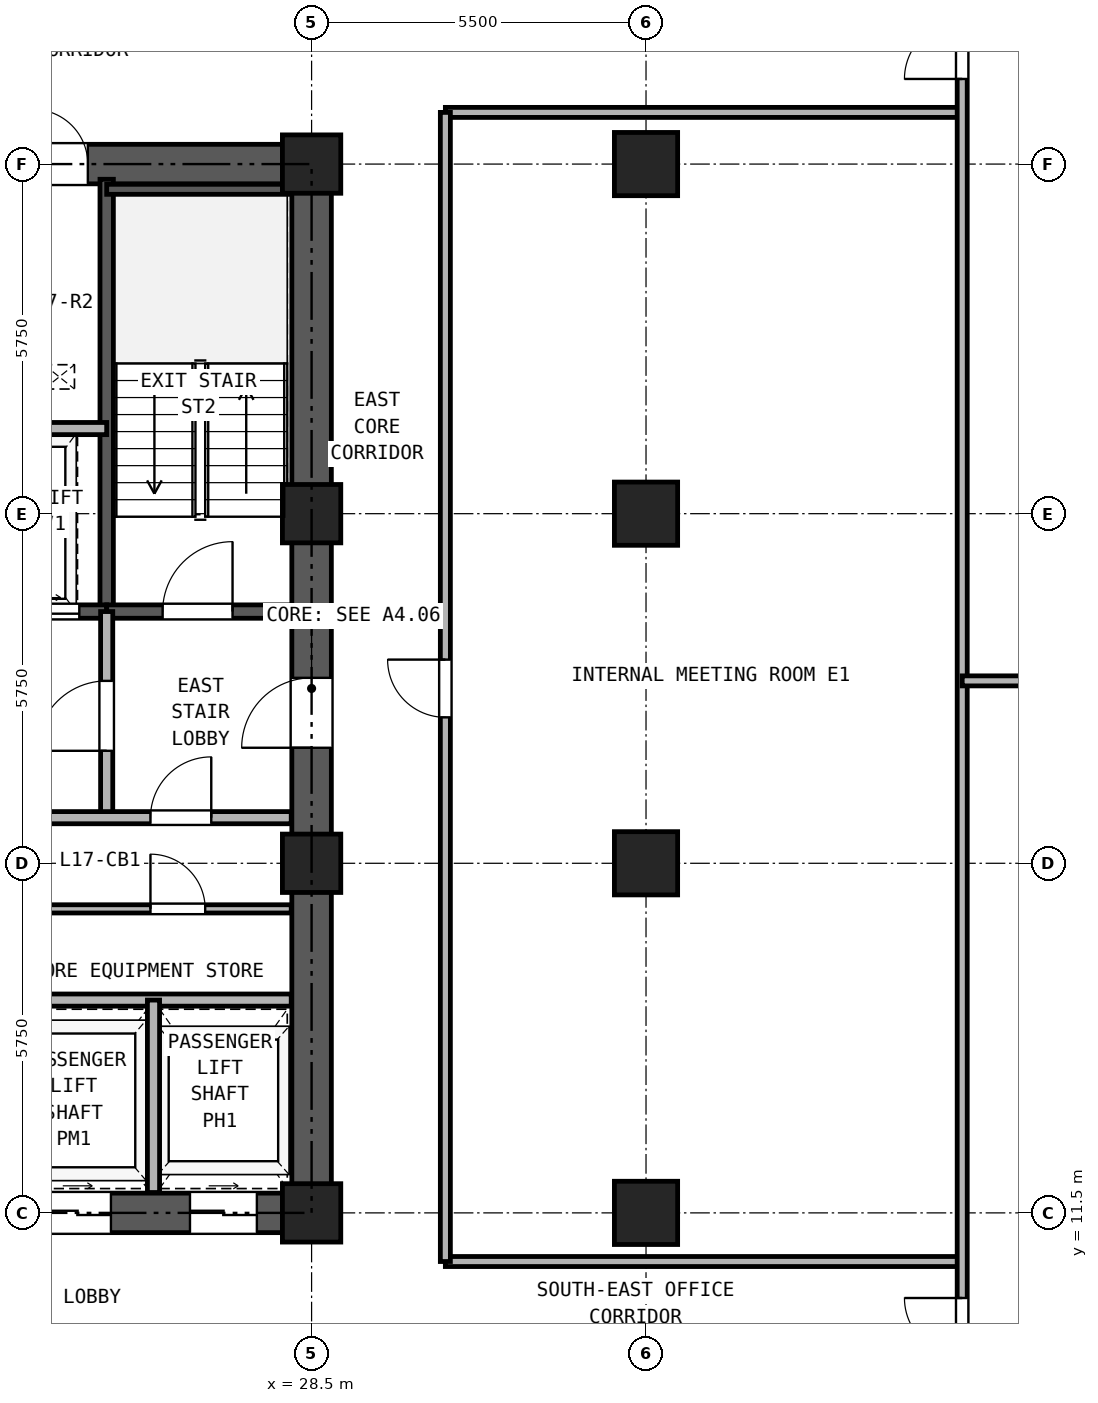
"""IFC4 building model, lengths in metres.
Left out: names, types, materials, properties, quantities, classifications, styles, units other than length and angle.
Written with IfcOpenShell. Run it as: python <this file> out.ifc"""

import sys

from ifc_helpers import new_model, si_unit, direction, frame, frame_2d, origin, origin_2d, place, context, subcontext, project, spatial, rectangle, hollow_rectangle, extrude, source, transform, mapped, element, fill, save


model = new_model("IFC4")
c1 = context("Model", 3, precision=1e-05, world=origin(), true_north=direction((0.0, 1.0)))
c2 = subcontext(c1, "Body", "Model", "MODEL_VIEW")
j1 = project(units=[si_unit("LENGTHUNIT", "METRE"), si_unit("PLANEANGLEUNIT", "RADIAN")], contexts=[c1])
p1 = place(None, origin())
s1 = spatial("IfcSite", under=j1, at=p1, CompositionType="ELEMENT")
p2 = place(p1, origin())
s2 = spatial("IfcBuilding", under=s1, at=p2, CompositionType="ELEMENT")
p3 = place(p2, frame((0.0, 0.0, 65.7)))
s3 = spatial("IfcBuildingStorey", under=s2, at=p3, CompositionType="ELEMENT", Elevation=65.7)
m1 = source(origin(), c2, "Body", "SweptSolid", [
    extrude(hollow_rectangle(XDim=0.96, YDim=0.96, WallThickness=0.06, at=origin_2d()), origin(), (0.0, 0.0, 1.0), 3.32),
])
for number, where, z_axis, x_axis in (
    (1, (28.5, 11.5, 0.0), (0.0, 0.0, 1.0), (1.0, 0.0, 0.0)),
    (2, (28.5, 17.25, 0.0), (0.0, 0.0, 1.0), (1.0, 0.0, 0.0)),
    (3, (28.5, 23.0, 0.0), (0.0, 0.0, 1.0), (1.0, 0.0, 0.0)),
    (4, (28.5, 28.75, 0.0), (0.0, 0.0, 1.0), (1.0, 0.0, 0.0)),
):
    element("IfcColumn", number, at=place(p3, frame(where, z_axis=z_axis, x_axis=x_axis)), inside=s3, PredefinedType="COLUMN", context=c2, shape_type="MappedRepresentation", body=[
        mapped(m1, transform((0.0, 0.0, 0.0), x_axis=(1.0, 0.0, 0.0), y_axis=(0.0, 1.0, 0.0), z_axis=(0.0, 0.0, 1.0), scale=1.0)),
    ])
m2 = source(origin(), c2, "Body", "SweptSolid", [
    extrude(hollow_rectangle(XDim=1.04, YDim=1.04, WallThickness=0.065, at=origin_2d()), origin(), (0.0, 0.0, 1.0), 3.32),
])
for number, where, z_axis, x_axis in (
    (5, (34.0, 11.5, 0.0), (0.0, 0.0, 1.0), (1.0, 0.0, 0.0)),
    (6, (34.0, 17.25, 0.0), (0.0, 0.0, 1.0), (1.0, 0.0, 0.0)),
    (7, (34.0, 23.0, 0.0), (0.0, 0.0, 1.0), (1.0, 0.0, 0.0)),
    (8, (34.0, 28.75, 0.0), (0.0, 0.0, 1.0), (1.0, 0.0, 0.0)),
):
    element("IfcColumn", number, at=place(p3, frame(where, z_axis=z_axis, x_axis=x_axis)), inside=s3, PredefinedType="COLUMN", context=c2, shape_type="MappedRepresentation", body=[
        mapped(m2, transform((0.0, 0.0, 0.0), x_axis=(1.0, 0.0, 0.0), y_axis=(0.0, 1.0, 0.0), z_axis=(0.0, 0.0, 1.0), scale=1.0)),
    ])
p4 = place(p3, frame((18.175, 11.5, 0.0), z_axis=(0.0, 0.0, 1.0), x_axis=(1.0, 0.0, 0.0)))
e9 = element("IfcWall", 9, at=p4, inside=s3, PredefinedType="SHEAR", context=c2, shape_type="SweptSolid", body=[
    extrude(rectangle(XDim=10.65, YDim=0.65, at=frame_2d((5.325, 0.0))), origin(), (0.0, 0.0, 1.0), 3.32),
])
p5 = place(p4, frame((1.195, 0.0, 0.0)))
e10 = element("IfcOpeningElement", 10, at=p5, cuts=e9, PredefinedType="OPENING", context=c2, shape_type="SweptSolid", body=[
    extrude(rectangle(XDim=1.1, YDim=2.25, at=frame_2d((0.55, 1.125))), frame((0.0, 0.335, 0.0), z_axis=(0.0, -1.0, 0.0), x_axis=(1.0, 0.0, 0.0)), (0.0, 0.0, 1.0), 0.67),
])
p6 = place(p4, frame((3.495, 0.0, 0.0)))
e11 = element("IfcOpeningElement", 11, at=p6, cuts=e9, PredefinedType="OPENING", context=c2, shape_type="SweptSolid", body=[
    extrude(rectangle(XDim=1.1, YDim=2.25, at=frame_2d((0.55, 1.125))), frame((0.0, 0.335, 0.0), z_axis=(0.0, -1.0, 0.0), x_axis=(1.0, 0.0, 0.0)), (0.0, 0.0, 1.0), 0.67),
])
p7 = place(p4, frame((5.925, 0.0, 0.0)))
e12 = element("IfcOpeningElement", 12, at=p7, cuts=e9, PredefinedType="OPENING", context=c2, shape_type="SweptSolid", body=[
    extrude(rectangle(XDim=1.1, YDim=2.25, at=frame_2d((0.55, 1.125))), frame((0.0, 0.335, 0.0), z_axis=(0.0, -1.0, 0.0), x_axis=(1.0, 0.0, 0.0)), (0.0, 0.0, 1.0), 0.67),
])
p8 = place(p4, frame((8.325, 0.0, 0.0)))
e13 = element("IfcOpeningElement", 13, at=p8, cuts=e9, PredefinedType="OPENING", context=c2, shape_type="SweptSolid", body=[
    extrude(rectangle(XDim=1.1, YDim=2.25, at=frame_2d((0.55, 1.125))), frame((0.0, 0.335, 0.0), z_axis=(0.0, -1.0, 0.0), x_axis=(1.0, 0.0, 0.0)), (0.0, 0.0, 1.0), 0.67),
])
p9 = place(p3, frame((18.175, 28.75, 0.0), z_axis=(0.0, 0.0, 1.0), x_axis=(1.0, 0.0, 0.0)))
e14 = element("IfcWall", 14, at=p9, inside=s3, PredefinedType="SHEAR", context=c2, shape_type="SweptSolid", body=[
    extrude(rectangle(XDim=10.65, YDim=0.65, at=frame_2d((5.325, 0.0))), origin(), (0.0, 0.0, 1.0), 3.32),
])
p10 = place(p9, frame((4.205, 0.0, 0.0)))
e15 = element("IfcOpeningElement", 15, at=p10, cuts=e14, PredefinedType="OPENING", context=c2, shape_type="SweptSolid", body=[
    extrude(rectangle(XDim=0.9, YDim=2.05, at=frame_2d((0.45, 1.025))), frame((0.0, 0.335, 0.0), z_axis=(0.0, -1.0, 0.0), x_axis=(1.0, 0.0, 0.0)), (0.0, 0.0, 1.0), 0.67),
])
p11 = place(p9, frame((5.745, 0.0, 0.0)))
e16 = element("IfcOpeningElement", 16, at=p11, cuts=e14, PredefinedType="OPENING", context=c2, shape_type="SweptSolid", body=[
    extrude(rectangle(XDim=0.9, YDim=2.05, at=frame_2d((0.45, 1.025))), frame((0.0, 0.335, 0.0), z_axis=(0.0, -1.0, 0.0), x_axis=(1.0, 0.0, 0.0)), (0.0, 0.0, 1.0), 0.67),
])
p12 = place(p3, frame((28.5, 11.825, 0.0), z_axis=(0.0, 0.0, 1.0), x_axis=(0.0, 1.0, 0.0)))
e17 = element("IfcWall", 17, at=p12, inside=s3, PredefinedType="SHEAR", context=c2, shape_type="SweptSolid", body=[
    extrude(rectangle(XDim=16.6, YDim=0.65, at=frame_2d((8.3, 0.0))), origin(), (0.0, 0.0, 1.0), 3.32),
])
p13 = place(p12, frame((7.325, 0.0, 0.0)))
e18 = element("IfcOpeningElement", 18, at=p13, cuts=e17, PredefinedType="OPENING", context=c2, shape_type="SweptSolid", body=[
    extrude(rectangle(XDim=1.15, YDim=2.2, at=frame_2d((0.575, 1.1))), frame((0.0, 0.335, 0.0), z_axis=(0.0, -1.0, 0.0), x_axis=(1.0, 0.0, 0.0)), (0.0, 0.0, 1.0), 0.67),
])
p14 = place(p3, frame((25.13, 21.39, 0.0), z_axis=(0.0, 0.0, 1.0), x_axis=(0.0, 1.0, 0.0)))
e19 = element("IfcWall", 19, at=p14, inside=s3, PredefinedType="SOLIDWALL", context=c2, shape_type="SweptSolid", body=[
    extrude(rectangle(XDim=7.11, YDim=0.22, at=frame_2d((3.555, 0.0))), origin(), (0.0, 0.0, 1.0), 3.32),
])
p15 = place(p3, frame((25.13, 28.335, 0.0), z_axis=(0.0, 0.0, 1.0), x_axis=(1.0, 0.0, 0.0)))
e20 = element("IfcWall", 20, at=p15, inside=s3, PredefinedType="PARTITIONING", context=c2, shape_type="SweptSolid", body=[
    extrude(rectangle(XDim=3.035, YDim=0.165, at=frame_2d((1.518, 0.0))), origin(), (0.0, 0.0, 1.0), 3.32),
])
p16 = place(p3, frame((18.835, 21.39, 0.0), z_axis=(0.0, 0.0, 1.0), x_axis=(1.0, 0.0, 0.0)))
e21 = element("IfcWall", 21, at=p16, inside=s3, PredefinedType="SOLIDWALL", context=c2, shape_type="SweptSolid", body=[
    extrude(rectangle(XDim=6.295, YDim=0.22, at=frame_2d((3.147, 0.0))), origin(), (0.0, 0.0, 1.0), 3.32),
])
p17 = place(p16, frame((1.015, 0.0, 0.0)))
e22 = element("IfcOpeningElement", 22, at=p17, cuts=e21, PredefinedType="OPENING", context=c2, shape_type="SweptSolid", body=[
    extrude(rectangle(XDim=1.15, YDim=2.2, at=frame_2d((0.575, 1.1))), frame((0.0, 0.12, 0.0), z_axis=(0.0, -1.0, 0.0), x_axis=(1.0, 0.0, 0.0)), (0.0, 0.0, 1.0), 0.24),
])
p18 = place(p16, frame((4.745, 0.0, 0.0)))
e23 = element("IfcOpeningElement", 23, at=p18, cuts=e21, PredefinedType="OPENING", context=c2, shape_type="SweptSolid", body=[
    extrude(rectangle(XDim=1.1, YDim=2.25, at=frame_2d((0.55, 1.125))), frame((0.0, 0.12, 0.0), z_axis=(0.0, -1.0, 0.0), x_axis=(1.0, 0.0, 0.0)), (0.0, 0.0, 1.0), 0.24),
])
p19 = place(p3, frame((25.13, 21.39, 0.0), z_axis=(0.0, 0.0, 1.0), x_axis=(1.0, 0.0, 0.0)))
e24 = element("IfcWall", 24, at=p19, inside=s3, PredefinedType="SOLIDWALL", context=c2, shape_type="SweptSolid", body=[
    extrude(rectangle(XDim=3.035, YDim=0.22, at=frame_2d((1.518, 0.0))), origin(), (0.0, 0.0, 1.0), 3.32),
])
p20 = place(p19, frame((0.92, 0.0, 0.0)))
e25 = element("IfcOpeningElement", 25, at=p20, cuts=e24, PredefinedType="OPENING", context=c2, shape_type="SweptSolid", body=[
    extrude(rectangle(XDim=1.15, YDim=2.2, at=frame_2d((0.575, 1.1))), frame((0.0, 0.12, 0.0), z_axis=(0.0, -1.0, 0.0), x_axis=(1.0, 0.0, 0.0)), (0.0, 0.0, 1.0), 0.24),
])
p21 = place(p3, frame((22.11, 24.4, 0.0), z_axis=(0.0, 0.0, 1.0), x_axis=(1.0, 0.0, 0.0)))
e26 = element("IfcWall", 26, at=p21, inside=s3, PredefinedType="PARTITIONING", context=c2, shape_type="SweptSolid", body=[
    extrude(rectangle(XDim=3.02, YDim=0.2, at=frame_2d((1.51, 0.0))), origin(), (0.0, 0.0, 1.0), 3.32),
])
p22 = place(p3, frame((25.13, 18.0, 0.0), z_axis=(0.0, 0.0, 1.0), x_axis=(0.0, 1.0, 0.0)))
e27 = element("IfcWall", 27, at=p22, inside=s3, PredefinedType="PARTITIONING", context=c2, shape_type="SweptSolid", body=[
    extrude(rectangle(XDim=3.39, YDim=0.2, at=frame_2d((1.695, 0.0))), origin(), (0.0, 0.0, 1.0), 3.32),
])
p23 = place(p22, frame((1.1, 0.0, 0.0)))
e28 = element("IfcOpeningElement", 28, at=p23, cuts=e27, PredefinedType="OPENING", context=c2, shape_type="SweptSolid", body=[
    extrude(rectangle(XDim=1.15, YDim=2.2, at=frame_2d((0.575, 1.1))), frame((0.0, 0.11, 0.0), z_axis=(0.0, -1.0, 0.0), x_axis=(1.0, 0.0, 0.0)), (0.0, 0.0, 1.0), 0.22),
])
p24 = place(p3, frame((18.835, 18.0, 0.0), z_axis=(0.0, 0.0, 1.0), x_axis=(1.0, 0.0, 0.0)))
e29 = element("IfcWall", 29, at=p24, inside=s3, PredefinedType="PARTITIONING", context=c2, shape_type="SweptSolid", body=[
    extrude(rectangle(XDim=9.33, YDim=0.2, at=frame_2d((4.665, 0.0))), origin(), (0.0, 0.0, 1.0), 3.32),
])
p25 = place(p24, frame((0.415, 0.0, 0.0)))
e30 = element("IfcOpeningElement", 30, at=p25, cuts=e29, PredefinedType="OPENING", context=c2, shape_type="SweptSolid", body=[
    extrude(rectangle(XDim=1.3, YDim=2.3, at=frame_2d((0.65, 1.15))), frame((0.0, 0.11, 0.0), z_axis=(0.0, -1.0, 0.0), x_axis=(1.0, 0.0, 0.0)), (0.0, 0.0, 1.0), 0.22),
])
p26 = place(p24, frame((2.515, 0.0, 0.0)))
e31 = element("IfcOpeningElement", 31, at=p26, cuts=e29, PredefinedType="OPENING", context=c2, shape_type="SweptSolid", body=[
    extrude(rectangle(XDim=1.3, YDim=2.3, at=frame_2d((0.65, 1.15))), frame((0.0, 0.11, 0.0), z_axis=(0.0, -1.0, 0.0), x_axis=(1.0, 0.0, 0.0)), (0.0, 0.0, 1.0), 0.22),
])
p27 = place(p24, frame((7.015, 0.0, 0.0)))
e32 = element("IfcOpeningElement", 32, at=p27, cuts=e29, PredefinedType="OPENING", context=c2, shape_type="SweptSolid", body=[
    extrude(rectangle(XDim=1.0, YDim=2.15, at=frame_2d((0.5, 1.075))), frame((0.0, 0.11, 0.0), z_axis=(0.0, -1.0, 0.0), x_axis=(1.0, 0.0, 0.0)), (0.0, 0.0, 1.0), 0.22),
])
p28 = place(p3, frame((18.835, 15.0, 0.0), z_axis=(0.0, 0.0, 1.0), x_axis=(1.0, 0.0, 0.0)))
e33 = element("IfcWall", 33, at=p28, inside=s3, PredefinedType="PARTITIONING", context=c2, shape_type="SweptSolid", body=[
    extrude(rectangle(XDim=9.33, YDim=0.2, at=frame_2d((4.665, 0.0))), origin(), (0.0, 0.0, 1.0), 3.32),
])
p29 = place(p3, frame((23.3, 16.5, 0.0), z_axis=(0.0, 0.0, 1.0), x_axis=(1.0, 0.0, 0.0)))
e34 = element("IfcWall", 34, at=p29, inside=s3, PredefinedType="PARTITIONING", context=c2, shape_type="SweptSolid", body=[
    extrude(rectangle(XDim=4.865, YDim=0.135, at=frame_2d((2.433, 0.0))), origin(), (0.0, 0.0, 1.0), 3.32),
])
p30 = place(p29, frame((2.55, 0.0, 0.0)))
e35 = element("IfcOpeningElement", 35, at=p30, cuts=e34, PredefinedType="OPENING", context=c2, shape_type="SweptSolid", body=[
    extrude(rectangle(XDim=0.9, YDim=2.05, at=frame_2d((0.45, 1.025))), frame((0.0, 0.077, 0.0), z_axis=(0.0, -1.0, 0.0), x_axis=(1.0, 0.0, 0.0)), (0.0, 0.0, 1.0), 0.155),
])
p31 = place(p3, frame((25.9, 11.835, 0.0), z_axis=(0.0, 0.0, 1.0), x_axis=(0.0, 1.0, 0.0)))
e36 = element("IfcWall", 36, at=p31, inside=s3, PredefinedType="PARTITIONING", context=c2, shape_type="SweptSolid", body=[
    extrude(rectangle(XDim=3.165, YDim=0.2, at=frame_2d((1.583, 0.0))), origin(), (0.0, 0.0, 1.0), 3.32),
])
for number, where, z_axis, x_axis in (
    (37, (30.7, 10.7, 0.0), (0.0, 0.0, 1.0), (1.0, 0.0, 0.0)),
    (38, (30.7, 29.6, 0.0), (0.0, 0.0, 1.0), (1.0, 0.0, 0.0)),
):
    element("IfcWall", number, at=place(p3, frame(where, z_axis=z_axis, x_axis=x_axis)), inside=s3, PredefinedType="PARTITIONING", context=c2, shape_type="SweptSolid", body=[
        extrude(rectangle(XDim=8.5, YDim=0.165, at=frame_2d((4.25, 0.0))), origin(), (0.0, 0.0, 1.0), 3.32),
    ])
p32 = place(p3, frame((30.7, 10.7, 0.0), z_axis=(0.0, 0.0, 1.0), x_axis=(0.0, 1.0, 0.0)))
e39 = element("IfcWall", 39, at=p32, inside=s3, PredefinedType="PARTITIONING", context=c2, shape_type="SweptSolid", body=[
    extrude(rectangle(XDim=18.9, YDim=0.165, at=frame_2d((9.45, 0.0))), origin(), (0.0, 0.0, 1.0), 3.32),
])
p33 = place(p32, frame((8.95, 0.0, 0.0)))
e40 = element("IfcOpeningElement", 40, at=p33, cuts=e39, PredefinedType="OPENING", context=c2, shape_type="SweptSolid", body=[
    extrude(rectangle(XDim=0.95, YDim=2.15, at=frame_2d((0.475, 1.075))), frame((0.0, 0.093, 0.0), z_axis=(0.0, -1.0, 0.0), x_axis=(1.0, 0.0, 0.0)), (0.0, 0.0, 1.0), 0.185),
])
p34 = place(p3, frame((39.2, 0.16, 0.0), z_axis=(0.0, 0.0, 1.0), x_axis=(0.0, 1.0, 0.0)))
e41 = element("IfcWall", 41, at=p34, inside=s3, PredefinedType="PARTITIONING", context=c2, shape_type="SweptSolid", body=[
    extrude(rectangle(XDim=40.18, YDim=0.165, at=frame_2d((20.09, 0.0))), origin(), (0.0, 0.0, 1.0), 3.32),
])
p35 = place(p34, frame((8.99, 0.0, 0.0)))
e42 = element("IfcOpeningElement", 42, at=p35, cuts=e41, PredefinedType="OPENING", context=c2, shape_type="SweptSolid", body=[
    extrude(rectangle(XDim=0.95, YDim=2.15, at=frame_2d((0.475, 1.075))), frame((0.0, 0.093, 0.0), z_axis=(0.0, -1.0, 0.0), x_axis=(1.0, 0.0, 0.0)), (0.0, 0.0, 1.0), 0.185),
])
p36 = place(p34, frame((29.99, 0.0, 0.0)))
e43 = element("IfcOpeningElement", 43, at=p36, cuts=e41, PredefinedType="OPENING", context=c2, shape_type="SweptSolid", body=[
    extrude(rectangle(XDim=0.95, YDim=2.15, at=frame_2d((0.475, 1.075))), frame((0.0, 0.093, 0.0), z_axis=(0.0, -1.0, 0.0), x_axis=(1.0, 0.0, 0.0)), (0.0, 0.0, 1.0), 0.185),
])
p37 = place(p3, frame((39.2, 20.25, 0.0), z_axis=(0.0, 0.0, 1.0), x_axis=(1.0, 0.0, 0.0)))
e44 = element("IfcWall", 44, at=p37, inside=s3, PredefinedType="PARTITIONING", context=c2, shape_type="SweptSolid", body=[
    extrude(rectangle(XDim=7.64, YDim=0.165, at=frame_2d((3.82, 0.0))), origin(), (0.0, 0.0, 1.0), 2.898),
])
p38 = place(p20, frame((1.15, 0.0, 0.0), z_axis=(0.0, 0.0, 1.0), x_axis=(-1.0, 0.0, 0.0)))
e45 = element("IfcDoor", 45, at=p38, inside=s3, OperationType="SINGLE_SWING_RIGHT", PredefinedType="DOOR", context=c2, shape_type="SweptSolid", body=[
    extrude(rectangle(XDim=1.15, YDim=2.2, at=frame_2d((0.575, 1.1))), frame((0.0, 0.025, 0.0), z_axis=(0.0, -1.0, 0.0), x_axis=(1.0, 0.0, 0.0)), (0.0, 0.0, 1.0), 0.05),
])
fill(e25, e45)
p39 = place(p18, frame((1.1, 0.0, 0.0), z_axis=(0.0, 0.0, 1.0), x_axis=(-1.0, 0.0, 0.0)))
e46 = element("IfcDoor", 46, at=p39, inside=s3, OperationType="DOUBLE_DOOR_SLIDING", PredefinedType="DOOR", context=c2, shape_type="SweptSolid", body=[
    extrude(rectangle(XDim=1.1, YDim=2.25, at=frame_2d((0.55, 1.125))), frame((0.0, 0.025, 0.0), z_axis=(0.0, -1.0, 0.0), x_axis=(1.0, 0.0, 0.0)), (0.0, 0.0, 1.0), 0.05),
])
fill(e23, e46)
p40 = place(p23, origin())
e47 = element("IfcDoor", 47, at=p40, inside=s3, OperationType="SINGLE_SWING_LEFT", PredefinedType="DOOR", context=c2, shape_type="SweptSolid", body=[
    extrude(rectangle(XDim=1.15, YDim=2.2, at=frame_2d((0.575, 1.1))), frame((0.0, 0.025, 0.0), z_axis=(0.0, -1.0, 0.0), x_axis=(1.0, 0.0, 0.0)), (0.0, 0.0, 1.0), 0.05),
])
fill(e28, e47)
p41 = place(p27, frame((1.0, 0.0, 0.0), z_axis=(0.0, 0.0, 1.0), x_axis=(-1.0, 0.0, 0.0)))
e48 = element("IfcDoor", 48, at=p41, inside=s3, OperationType="SINGLE_SWING_RIGHT", PredefinedType="DOOR", context=c2, shape_type="SweptSolid", body=[
    extrude(rectangle(XDim=1.0, YDim=2.15, at=frame_2d((0.5, 1.075))), frame((0.0, 0.025, 0.0), z_axis=(0.0, -1.0, 0.0), x_axis=(1.0, 0.0, 0.0)), (0.0, 0.0, 1.0), 0.05),
])
fill(e32, e48)
p42 = place(p30, frame((0.9, 0.0, 0.0), z_axis=(0.0, 0.0, 1.0), x_axis=(-1.0, 0.0, 0.0)))
e49 = element("IfcDoor", 49, at=p42, inside=s3, OperationType="SINGLE_SWING_LEFT", PredefinedType="DOOR", context=c2, shape_type="SweptSolid", body=[
    extrude(rectangle(XDim=0.9, YDim=2.05, at=frame_2d((0.45, 1.025))), frame((0.0, 0.025, 0.0), z_axis=(0.0, -1.0, 0.0), x_axis=(1.0, 0.0, 0.0)), (0.0, 0.0, 1.0), 0.05),
])
fill(e35, e49)
p43 = place(p13, origin())
e50 = element("IfcDoor", 50, at=p43, inside=s3, OperationType="SINGLE_SWING_LEFT", PredefinedType="DOOR", context=c2, shape_type="SweptSolid", body=[
    extrude(rectangle(XDim=1.15, YDim=2.2, at=frame_2d((0.575, 1.1))), frame((0.0, 0.025, 0.0), z_axis=(0.0, -1.0, 0.0), x_axis=(1.0, 0.0, 0.0)), (0.0, 0.0, 1.0), 0.05),
])
fill(e18, e50)
p44 = place(p11, origin())
e51 = element("IfcDoor", 51, at=p44, inside=s3, OperationType="SINGLE_SWING_LEFT", PredefinedType="DOOR", context=c2, shape_type="SweptSolid", body=[
    extrude(rectangle(XDim=0.9, YDim=2.05, at=frame_2d((0.45, 1.025))), frame((0.0, 0.025, 0.0), z_axis=(0.0, -1.0, 0.0), x_axis=(1.0, 0.0, 0.0)), (0.0, 0.0, 1.0), 0.05),
])
fill(e16, e51)
p45 = place(p7, frame((1.1, 0.0, 0.0), z_axis=(0.0, 0.0, 1.0), x_axis=(-1.0, 0.0, 0.0)))
e52 = element("IfcDoor", 52, at=p45, inside=s3, OperationType="DOUBLE_DOOR_SLIDING", PredefinedType="DOOR", context=c2, shape_type="SweptSolid", body=[
    extrude(rectangle(XDim=1.1, YDim=2.25, at=frame_2d((0.55, 1.125))), frame((0.0, 0.025, 0.0), z_axis=(0.0, -1.0, 0.0), x_axis=(1.0, 0.0, 0.0)), (0.0, 0.0, 1.0), 0.05),
])
fill(e12, e52)
p46 = place(p8, frame((1.1, 0.0, 0.0), z_axis=(0.0, 0.0, 1.0), x_axis=(-1.0, 0.0, 0.0)))
e53 = element("IfcDoor", 53, at=p46, inside=s3, OperationType="DOUBLE_DOOR_SLIDING", PredefinedType="DOOR", context=c2, shape_type="SweptSolid", body=[
    extrude(rectangle(XDim=1.1, YDim=2.25, at=frame_2d((0.55, 1.125))), frame((0.0, 0.025, 0.0), z_axis=(0.0, -1.0, 0.0), x_axis=(1.0, 0.0, 0.0)), (0.0, 0.0, 1.0), 0.05),
])
fill(e13, e53)
p47 = place(p35, origin())
e54 = element("IfcDoor", 54, at=p47, inside=s3, OperationType="SINGLE_SWING_RIGHT", PredefinedType="DOOR", context=c2, shape_type="SweptSolid", body=[
    extrude(rectangle(XDim=0.95, YDim=2.15, at=frame_2d((0.475, 1.075))), frame((0.0, 0.025, 0.0), z_axis=(0.0, -1.0, 0.0), x_axis=(1.0, 0.0, 0.0)), (0.0, 0.0, 1.0), 0.05),
])
fill(e42, e54)
p48 = place(p36, origin())
e55 = element("IfcDoor", 55, at=p48, inside=s3, OperationType="SINGLE_SWING_LEFT", PredefinedType="DOOR", context=c2, shape_type="SweptSolid", body=[
    extrude(rectangle(XDim=0.95, YDim=2.15, at=frame_2d((0.475, 1.075))), frame((0.0, 0.025, 0.0), z_axis=(0.0, -1.0, 0.0), x_axis=(1.0, 0.0, 0.0)), (0.0, 0.0, 1.0), 0.05),
])
fill(e43, e55)
p49 = place(p33, origin())
e56 = element("IfcDoor", 56, at=p49, inside=s3, OperationType="SINGLE_SWING_RIGHT", PredefinedType="DOOR", context=c2, shape_type="SweptSolid", body=[
    extrude(rectangle(XDim=0.95, YDim=2.15, at=frame_2d((0.475, 1.075))), frame((0.0, 0.025, 0.0), z_axis=(0.0, -1.0, 0.0), x_axis=(1.0, 0.0, 0.0)), (0.0, 0.0, 1.0), 0.05),
])
fill(e40, e56)
save(model, sys.argv[1])
